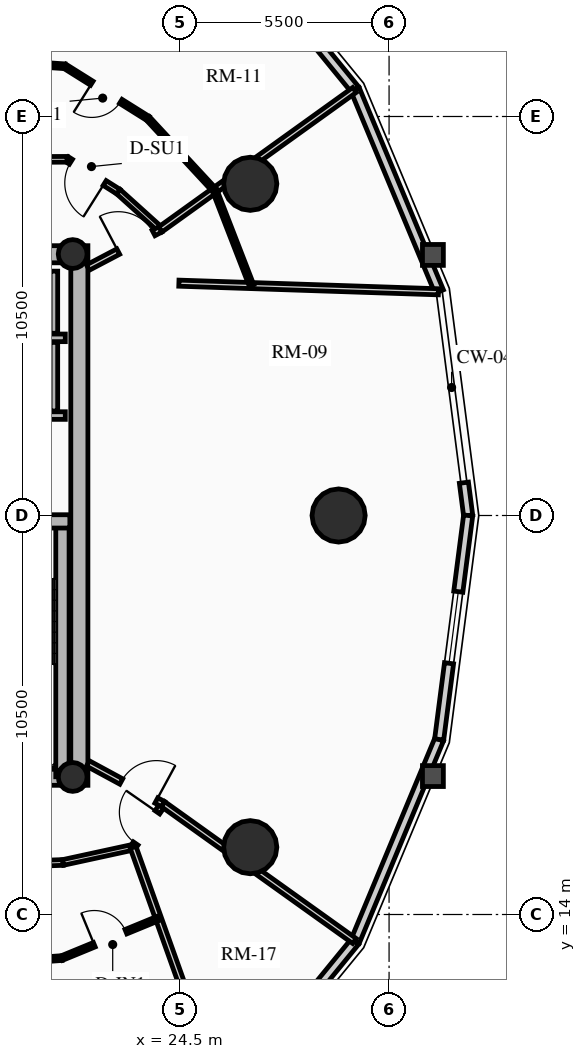
"""IFC4 building model, lengths in metres.
Left out: names, types, materials, properties, quantities, classifications, styles, units other than length and angle.
Written with IfcOpenShell. Run it as: python <this file> out.ifc"""

import sys

from ifc_helpers import new_model, si_unit, direction, frame, frame_2d, origin, origin_2d, place, context, subcontext, project, spatial, rectangle, circle, hollow_circle, extrude, source, transform, mapped, element, fill, save


model = new_model("IFC4")
c1 = context("Model", 3, precision=1e-05, world=origin(), true_north=direction((0.0, 1.0)))
c2 = subcontext(c1, "Body", "Model", "MODEL_VIEW")
j1 = project(units=[si_unit("LENGTHUNIT", "METRE"), si_unit("PLANEANGLEUNIT", "RADIAN")], contexts=[c1])
p1 = place(None, origin())
s1 = spatial("IfcSite", under=j1, at=p1, CompositionType="ELEMENT")
p2 = place(p1, origin())
s2 = spatial("IfcBuilding", under=s1, at=p2, CompositionType="ELEMENT")
p3 = place(p2, frame((0.0, 0.0, 107.98)))
s3 = spatial("IfcBuildingStorey", under=s2, at=p3, CompositionType="ELEMENT", Elevation=107.98)
p4 = place(p3, frame((21.85, 17.4, 0.0), z_axis=(0.0, 0.0, 1.0), x_axis=(0.0, 1.0, 0.0)))
e1 = element("IfcWall", 1, at=p4, inside=s3, PredefinedType="SHEAR", context=c2, shape_type="SweptSolid", body=[
    extrude(rectangle(XDim=14.2, YDim=0.45, at=frame_2d((7.1, 0.0))), origin(), (0.0, 0.0, 1.0), 2.91),
])
p5 = place(p3, frame((11.15, 17.625, 0.0), z_axis=(0.0, 0.0, 1.0), x_axis=(1.0, 0.0, 0.0)))
e2 = element("IfcWall", 2, at=p5, inside=s3, PredefinedType="SHEAR", context=c2, shape_type="SweptSolid", body=[
    extrude(rectangle(XDim=10.7, YDim=0.45, at=frame_2d((5.35, 0.0))), origin(), (0.0, 0.0, 1.0), 2.91),
])
m1 = source(origin(), c2, "Body", "SweptSolid", [
    extrude(rectangle(XDim=1.5, YDim=2.02, at=frame_2d((0.75, 1.01))), frame((0.0, 0.235, 0.0), z_axis=(0.0, -1.0, 0.0), x_axis=(1.0, 0.0, 0.0)), (0.0, 0.0, 1.0), 0.47),
])
p6 = place(p5, frame((5.45, 0.0, 0.0)))
e3 = element("IfcOpeningElement", 3, at=p6, cuts=e2, PredefinedType="OPENING", context=c2, shape_type="MappedRepresentation", body=[
    mapped(m1, transform((0.0, 0.0, 0.0), x_axis=(1.0, 0.0, 0.0), y_axis=(0.0, 1.0, 0.0), z_axis=(0.0, 0.0, 1.0), scale=1.0)),
])
p7 = place(p3, frame((11.15, 31.375, 0.0), z_axis=(0.0, 0.0, 1.0), x_axis=(1.0, 0.0, 0.0)))
e4 = element("IfcWall", 4, at=p7, inside=s3, PredefinedType="SHEAR", context=c2, shape_type="SweptSolid", body=[
    extrude(rectangle(XDim=10.7, YDim=0.45, at=frame_2d((5.35, 0.0))), origin(), (0.0, 0.0, 1.0), 2.91),
])
p8 = place(p7, frame((4.6, 0.0, 0.0)))
e5 = element("IfcOpeningElement", 5, at=p8, cuts=e4, PredefinedType="OPENING", context=c2, shape_type="MappedRepresentation", body=[
    mapped(m1, transform((0.0, 0.0, 0.0), x_axis=(1.0, 0.0, 0.0), y_axis=(0.0, 1.0, 0.0), z_axis=(0.0, 0.0, 1.0), scale=1.0)),
])
p9 = place(p3, frame((21.405, 17.625, 0.0), z_axis=(0.0, 0.0, 1.0), x_axis=(0.0, 1.0, 0.0)))
e6 = element("IfcWall", 6, at=p9, inside=s3, PredefinedType="SHEAR", context=c2, shape_type="SweptSolid", body=[
    extrude(rectangle(XDim=6.72, YDim=0.35, at=frame_2d((3.36, 0.0))), origin(), (0.0, 0.0, 1.0), 2.91),
])
p10 = place(p3, frame((18.315, 24.345, 0.0), z_axis=(0.0, 0.0, 1.0), x_axis=(1.0, 0.0, 0.0)))
e7 = element("IfcWall", 7, at=p10, inside=s3, PredefinedType="SHEAR", context=c2, shape_type="SweptSolid", body=[
    extrude(rectangle(XDim=3.285, YDim=0.35, at=frame_2d((1.643, 0.0))), origin(), (0.0, 0.0, 1.0), 2.91),
])
for number, where, z_axis, x_axis in (
    (8, (21.675, 17.62, 0.0), (0.0, 0.0, 1.0), (1.0, 0.0, 0.0)),
    (9, (21.675, 31.38, 0.0), (0.0, 0.0, 1.0), (1.0, 0.0, 0.0)),
):
    element("IfcColumn", number, at=place(p3, frame(where, z_axis=z_axis, x_axis=x_axis)), inside=s3, PredefinedType="COLUMN", context=c2, shape_type="SweptSolid", body=[
        extrude(hollow_circle(Radius=0.38, WallThickness=0.032, at=origin_2d()), origin(), (0.0, 0.0, 1.0), 2.91),
    ])
for number, where, z_axis, x_axis in (
    (10, (28.672, 24.5, 0.0), (0.0, 0.0, 1.0), (1.0, 0.0, 0.0)),
    (11, (26.347, 33.229, 0.0), (0.0, 0.0, 1.0), (1.0, 0.0, 0.0)),
    (12, (26.347, 15.771, 0.0), (0.0, 0.0, 1.0), (1.0, 0.0, 0.0)),
):
    element("IfcColumn", number, at=place(p3, frame(where, z_axis=z_axis, x_axis=x_axis)), inside=s3, PredefinedType="USERDEFINED", context=c2, shape_type="SweptSolid", body=[
        extrude(circle(Radius=0.7, at=origin_2d()), origin(), (0.0, 0.0, 1.0), 2.91),
    ])
p11 = place(p3, frame((31.969, 25.363, 0.0), z_axis=(0.0, 0.0, 1.0), x_axis=(0.128523364007, -0.991706481225, 0.0)))
e13 = element("IfcWall", 13, at=p11, inside=s3, PredefinedType="SOLIDWALL", context=c2, shape_type="SweptSolid", body=[
    extrude(rectangle(XDim=0.87, YDim=0.24, at=frame_2d((0.435, 0.0))), origin(), (0.0, 0.0, 1.0), 2.655),
])
p12 = place(p3, frame((29.105, 35.709, 0.0), z_axis=(0.0, 0.0, 1.0), x_axis=(0.384344417632, -0.923189779317, 0.0)))
e14 = element("IfcWall", 14, at=p12, inside=s3, PredefinedType="SOLIDWALL", context=c2, shape_type="SweptSolid", body=[
    extrude(rectangle(XDim=5.758, YDim=0.24, at=frame_2d((2.879, 0.0))), origin(), (0.0, 0.0, 1.0), 2.179),
])
p13 = place(p3, frame((25.658, 39.928, 0.0), z_axis=(0.0, 0.0, 1.0), x_axis=(0.632700781152, -0.77439635945, 0.0)))
e15 = element("IfcWall", 15, at=p13, inside=s3, PredefinedType="SOLIDWALL", context=c2, shape_type="SweptSolid", body=[
    extrude(rectangle(XDim=5.448, YDim=0.24, at=frame_2d((2.724, 0.0))), origin(), (0.0, 0.0, 1.0), 2.179),
])
m2 = source(origin(), c2, "Body", "SweptSolid", [
    extrude(rectangle(XDim=2.2, YDim=1.35, at=frame_2d((1.1, 0.675))), frame((0.0, 0.13, 0.0), z_axis=(0.0, -1.0, 0.0), x_axis=(1.0, 0.0, 0.0)), (0.0, 0.0, 1.0), 0.26),
])
p14 = place(p13, frame((1.624, 0.0, 0.65)))
e16 = element("IfcOpeningElement", 16, at=p14, cuts=e15, PredefinedType="OPENING", context=c2, shape_type="MappedRepresentation", body=[
    mapped(m2, transform((0.0, 0.0, 0.0), x_axis=(1.0, 0.0, 0.0), y_axis=(0.0, 1.0, 0.0), z_axis=(0.0, 0.0, 1.0), scale=1.0)),
])
p15 = place(p3, frame((29.105, 13.291, 0.0), z_axis=(0.0, 0.0, 1.0), x_axis=(-0.632700781152, -0.77439635945, 0.0)))
e17 = element("IfcWall", 17, at=p15, inside=s3, PredefinedType="SOLIDWALL", context=c2, shape_type="SweptSolid", body=[
    extrude(rectangle(XDim=5.448, YDim=0.24, at=frame_2d((2.724, 0.0))), origin(), (0.0, 0.0, 1.0), 2.179),
])
p16 = place(p15, frame((1.624, 0.0, 0.65)))
e18 = element("IfcOpeningElement", 18, at=p16, cuts=e17, PredefinedType="OPENING", context=c2, shape_type="MappedRepresentation", body=[
    mapped(m2, transform((0.0, 0.0, 0.0), x_axis=(1.0, 0.0, 0.0), y_axis=(0.0, 1.0, 0.0), z_axis=(0.0, 0.0, 1.0), scale=1.0)),
])
p17 = place(p3, frame((31.318, 18.607, 0.0), z_axis=(0.0, 0.0, 1.0), x_axis=(-0.384344417632, -0.923189779317, 0.0)))
e19 = element("IfcWall", 19, at=p17, inside=s3, PredefinedType="SOLIDWALL", context=c2, shape_type="SweptSolid", body=[
    extrude(rectangle(XDim=5.758, YDim=0.24, at=frame_2d((2.879, 0.0))), origin(), (0.0, 0.0, 1.0), 2.179),
])
p18 = place(p3, frame((32.081, 24.5, 0.0), z_axis=(0.0, 0.0, 1.0), x_axis=(-0.128351991996, -0.991728675672, 0.0)))
e20 = element("IfcWall", 20, at=p18, inside=s3, PredefinedType="SOLIDWALL", context=c2, shape_type="SweptSolid", body=[
    extrude(rectangle(XDim=5.942, YDim=0.24, at=frame_2d((2.971, 0.0))), origin(), (0.0, 0.0, 1.0), 2.179),
])
m3 = source(origin(), c2, "Body", "SweptSolid", [
    extrude(rectangle(XDim=1.9, YDim=1.35, at=frame_2d((0.95, 0.675))), frame((0.0, 0.13, 0.0), z_axis=(0.0, -1.0, 0.0), x_axis=(1.0, 0.0, 0.0)), (0.0, 0.0, 1.0), 0.26),
])
p19 = place(p18, frame((2.021, 0.0, 0.65)))
e21 = element("IfcOpeningElement", 21, at=p19, cuts=e20, PredefinedType="OPENING", context=c2, shape_type="MappedRepresentation", body=[
    mapped(m3, transform((0.0, 0.0, 0.0), x_axis=(1.0, 0.0, 0.0), y_axis=(0.0, 1.0, 0.0), z_axis=(0.0, 0.0, 1.0), scale=1.0)),
])
for number, where, z_axis, x_axis in (
    (22, (18.51, 27.13, 0.0), (0.0, 0.0, 1.0), (1.0, 0.0, 0.0)),
    (23, (18.51, 29.175, 0.0), (0.0, 0.0, 1.0), (1.0, 0.0, 0.0)),
):
    element("IfcWall", number, at=place(p3, frame(where, z_axis=z_axis, x_axis=x_axis)), inside=s3, PredefinedType="SHEAR", context=c2, shape_type="SweptSolid", body=[
        extrude(rectangle(XDim=2.97, YDim=0.2, at=frame_2d((1.485, 0.0))), origin(), (0.0, 0.0, 1.0), 2.91),
    ])
p20 = place(p3, frame((21.18, 27.25, 0.0), z_axis=(0.0, 0.0, 1.0), x_axis=(0.0, 1.0, 0.0)))
e24 = element("IfcWall", 24, at=p20, inside=s3, PredefinedType="SHEAR", context=c2, shape_type="SweptSolid", body=[
    extrude(rectangle(XDim=1.805, YDim=0.2, at=frame_2d((0.902, 0.0))), origin(), (0.0, 0.0, 1.0), 2.91),
])
p21 = place(p3, frame((21.18, 29.295, 0.0), z_axis=(0.0, 0.0, 1.0), x_axis=(0.0, 1.0, 0.0)))
e25 = element("IfcWall", 25, at=p21, inside=s3, PredefinedType="SHEAR", context=c2, shape_type="SweptSolid", body=[
    extrude(rectangle(XDim=1.635, YDim=0.2, at=frame_2d((0.817, 0.0))), origin(), (0.0, 0.0, 1.0), 2.91),
])
p22 = place(p3, frame((23.98, 32.027, 0.0), z_axis=(0.0, 0.0, 1.0), x_axis=(-0.742353224332, 0.670008724065, 0.0)))
e26 = element("IfcWall", 26, at=p22, inside=s3, PredefinedType="PARTITIONING", context=c2, shape_type="SweptSolid", body=[
    extrude(rectangle(XDim=1.485, YDim=0.15, at=frame_2d((0.742, 0.0))), origin(), (0.0, 0.0, 1.0), 2.225),
])
p23 = place(p3, frame((22.877, 33.022, 0.0), z_axis=(0.0, 0.0, 1.0), x_axis=(-0.845895608855, 0.533348496689, 0.0)))
e27 = element("IfcWall", 27, at=p23, inside=s3, PredefinedType="PARTITIONING", context=c2, shape_type="SweptSolid", body=[
    extrude(rectangle(XDim=1.597, YDim=0.15, at=frame_2d((0.798, 0.0))), origin(), (0.0, 0.0, 1.0), 2.225),
])
m4 = source(origin(), c2, "Body", "SweptSolid", [
    extrude(rectangle(XDim=1.05, YDim=2.015, at=frame_2d((0.525, 1.007))), frame((0.0, 0.085, 0.0), z_axis=(0.0, -1.0, 0.0), x_axis=(1.0, 0.0, 0.0)), (0.0, 0.0, 1.0), 0.17),
])
p24 = place(p23, frame((0.427, 0.0, 0.0)))
e28 = element("IfcOpeningElement", 28, at=p24, cuts=e27, PredefinedType="OPENING", context=c2, shape_type="MappedRepresentation", body=[
    mapped(m4, transform((0.0, 0.0, 0.0), x_axis=(1.0, 0.0, 0.0), y_axis=(0.0, 1.0, 0.0), z_axis=(0.0, 0.0, 1.0), scale=1.0)),
])
p25 = place(p3, frame((21.527, 33.873, 0.0), z_axis=(0.0, 0.0, 1.0), x_axis=(-0.999991838845, -0.004040079574, 0.0)))
e29 = element("IfcWall", 29, at=p25, inside=s3, PredefinedType="PARTITIONING", context=c2, shape_type="SweptSolid", body=[
    extrude(rectangle(XDim=3.384, YDim=0.15, at=frame_2d((1.692, 0.0))), origin(), (0.0, 0.0, 1.0), 2.225),
])
p26 = place(p3, frame((14.781, 15.141, 0.0), z_axis=(0.0, 0.0, 1.0), x_axis=(0.999407918707, 0.034406569513, 0.0)))
e30 = element("IfcWall", 30, at=p26, inside=s3, PredefinedType="PARTITIONING", context=c2, shape_type="SweptSolid", body=[
    extrude(rectangle(XDim=6.642, YDim=0.15, at=frame_2d((3.321, 0.0))), origin(), (0.0, 0.0, 1.0), 2.225),
])
p27 = place(p26, frame((2.796, 0.0, 0.0)))
e31 = element("IfcOpeningElement", 31, at=p27, cuts=e30, PredefinedType="OPENING", context=c2, shape_type="MappedRepresentation", body=[
    mapped(m4, transform((0.0, 0.0, 0.0), x_axis=(1.0, 0.0, 0.0), y_axis=(0.0, 1.0, 0.0), z_axis=(0.0, 0.0, 1.0), scale=1.0)),
])
p28 = place(p3, frame((21.419, 15.369, 0.0), z_axis=(0.0, 0.0, 1.0), x_axis=(0.977192701953, 0.212354475464, 0.0)))
e32 = element("IfcWall", 32, at=p28, inside=s3, PredefinedType="PARTITIONING", context=c2, shape_type="SweptSolid", body=[
    extrude(rectangle(XDim=1.888, YDim=0.15, at=frame_2d((0.944, 0.0))), origin(), (0.0, 0.0, 1.0), 2.225),
])
p29 = place(p3, frame((23.263, 15.77, 0.0), z_axis=(0.0, 0.0, 1.0), x_axis=(0.570743456919, 0.821128434768, 0.0)))
e33 = element("IfcWall", 33, at=p29, inside=s3, PredefinedType="PARTITIONING", context=c2, shape_type="SweptSolid", body=[
    extrude(rectangle(XDim=1.382, YDim=0.15, at=frame_2d((0.691, 0.0))), origin(), (0.0, 0.0, 1.0), 2.225),
])
m5 = source(origin(), c2, "Body", "SweptSolid", [
    extrude(rectangle(XDim=1.0, YDim=2.015, at=frame_2d((0.5, 1.007))), frame((0.0, 0.085, 0.0), z_axis=(0.0, -1.0, 0.0), x_axis=(1.0, 0.0, 0.0)), (0.0, 0.0, 1.0), 0.17),
])
p30 = place(p29, frame((0.12, 0.0, 0.0)))
e34 = element("IfcOpeningElement", 34, at=p30, cuts=e33, PredefinedType="OPENING", context=c2, shape_type="MappedRepresentation", body=[
    mapped(m5, transform((0.0, 0.0, 0.0), x_axis=(1.0, 0.0, 0.0), y_axis=(0.0, 1.0, 0.0), z_axis=(0.0, 0.0, 1.0), scale=1.0)),
])
p31 = place(p3, frame((24.469, 30.614, 0.0), z_axis=(0.0, 0.0, 1.0), x_axis=(0.999446768925, -0.033258924898, 0.0)))
e35 = element("IfcWall", 35, at=p31, inside=s3, PredefinedType="PARTITIONING", context=c2, shape_type="SweptSolid", body=[
    extrude(rectangle(XDim=6.834, YDim=0.16, at=frame_2d((3.417, 0.0))), origin(), (0.0, 0.0, 1.0), 2.179),
])
p32 = place(p3, frame((23.98, 32.027, 0.0), z_axis=(0.0, 0.0, 1.0), x_axis=(0.812162479031, 0.58343132214, 0.0)))
e36 = element("IfcWall", 36, at=p32, inside=s3, PredefinedType="PARTITIONING", context=c2, shape_type="SweptSolid", body=[
    extrude(rectangle(XDim=6.291, YDim=0.16, at=frame_2d((3.146, 0.0))), origin(), (0.0, 0.0, 1.0), 2.179),
])
p33 = place(p3, frame((23.263, 15.77, 0.0), z_axis=(0.0, 0.0, 1.0), x_axis=(0.335919964206, -0.941890533793, 0.0)))
e37 = element("IfcWall", 37, at=p33, inside=s3, PredefinedType="PARTITIONING", context=c2, shape_type="SweptSolid", body=[
    extrude(rectangle(XDim=7.094, YDim=0.16, at=frame_2d((3.547, 0.0))), origin(), (0.0, 0.0, 1.0), 2.179),
])
p34 = place(p3, frame((24.052, 16.905, 0.0), z_axis=(0.0, 0.0, 1.0), x_axis=(0.813437670746, -0.581652091727, 0.0)))
e38 = element("IfcWall", 38, at=p34, inside=s3, PredefinedType="PARTITIONING", context=c2, shape_type="SweptSolid", body=[
    extrude(rectangle(XDim=6.192, YDim=0.16, at=frame_2d((3.096, 0.0))), origin(), (0.0, 0.0, 1.0), 2.179),
])
p35 = place(p3, frame((22.075, 31.025, 0.0), z_axis=(0.0, 0.0, 1.0), x_axis=(0.885026466958, 0.465540710125, 0.0)))
e39 = element("IfcWall", 39, at=p35, inside=s3, PredefinedType="PARTITIONING", context=c2, shape_type="SweptSolid", body=[
    extrude(rectangle(XDim=2.152, YDim=0.16, at=frame_2d((1.076, 0.0))), origin(), (0.0, 0.0, 1.0), 2.225),
])
m6 = source(origin(), c2, "Body", "SweptSolid", [
    extrude(rectangle(XDim=1.05, YDim=2.015, at=frame_2d((0.525, 1.007))), frame((0.0, 0.09, 0.0), z_axis=(0.0, -1.0, 0.0), x_axis=(1.0, 0.0, 0.0)), (0.0, 0.0, 1.0), 0.18),
])
p36 = place(p35, frame((0.902, 0.0, 0.0)))
e40 = element("IfcOpeningElement", 40, at=p36, cuts=e39, PredefinedType="OPENING", context=c2, shape_type="MappedRepresentation", body=[
    mapped(m6, transform((0.0, 0.0, 0.0), x_axis=(1.0, 0.0, 0.0), y_axis=(0.0, 1.0, 0.0), z_axis=(0.0, 0.0, 1.0), scale=1.0)),
])
p37 = place(p3, frame((22.075, 17.975, 0.0), z_axis=(0.0, 0.0, 1.0), x_axis=(0.879356383302, -0.476164206073, 0.0)))
e41 = element("IfcWall", 41, at=p37, inside=s3, PredefinedType="PARTITIONING", context=c2, shape_type="SweptSolid", body=[
    extrude(rectangle(XDim=2.248, YDim=0.16, at=frame_2d((1.124, 0.0))), origin(), (0.0, 0.0, 1.0), 2.225),
])
p38 = place(p37, frame((0.998, 0.0, 0.0)))
e42 = element("IfcOpeningElement", 42, at=p38, cuts=e41, PredefinedType="OPENING", context=c2, shape_type="MappedRepresentation", body=[
    mapped(m6, transform((0.0, 0.0, 0.0), x_axis=(1.0, 0.0, 0.0), y_axis=(0.0, 1.0, 0.0), z_axis=(0.0, 0.0, 1.0), scale=1.0)),
])
p39 = place(p3, frame((26.382, 30.551, 0.0), z_axis=(0.0, 0.0, 1.0), x_axis=(-0.361621391028, 0.932325034283, 0.0)))
e43 = element("IfcWall", 43, at=p39, inside=s3, PredefinedType="PARTITIONING", context=c2, shape_type="SweptSolid", body=[
    extrude(rectangle(XDim=2.686, YDim=0.125, at=frame_2d((1.343, 0.0))), origin(), (0.0, 0.0, 1.0), 2.225),
])
p40 = place(p3, frame((25.41, 33.054, 0.0), z_axis=(0.0, 0.0, 1.0), x_axis=(-0.679733694606, 0.73345899982, 0.0)))
e44 = element("IfcWall", 44, at=p40, inside=s3, PredefinedType="PARTITIONING", context=c2, shape_type="SweptSolid", body=[
    extrude(rectangle(XDim=2.586, YDim=0.125, at=frame_2d((1.293, 0.0))), origin(), (0.0, 0.0, 1.0), 2.655),
])
p41 = place(p3, frame((23.653, 34.951, 0.0), z_axis=(0.0, 0.0, 1.0), x_axis=(-0.847306782665, 0.531103771452, 0.0)))
e45 = element("IfcWall", 45, at=p41, inside=s3, PredefinedType="PARTITIONING", context=c2, shape_type="SweptSolid", body=[
    extrude(rectangle(XDim=2.581, YDim=0.125, at=frame_2d((1.291, 0.0))), origin(), (0.0, 0.0, 1.0), 2.225),
])
m7 = source(origin(), c2, "Body", "SweptSolid", [
    extrude(rectangle(XDim=0.9, YDim=2.005, at=frame_2d((0.45, 1.002))), frame((0.0, 0.073, 0.0), z_axis=(0.0, -1.0, 0.0), x_axis=(1.0, 0.0, 0.0)), (0.0, 0.0, 1.0), 0.145),
])
p42 = place(p41, frame((0.841, 0.0, 0.0)))
e46 = element("IfcOpeningElement", 46, at=p42, cuts=e45, PredefinedType="OPENING", context=c2, shape_type="MappedRepresentation", body=[
    mapped(m7, transform((0.0, 0.0, 0.0), x_axis=(1.0, 0.0, 0.0), y_axis=(0.0, 1.0, 0.0), z_axis=(0.0, 0.0, 1.0), scale=1.0)),
])
p43 = place(p3, frame((21.466, 36.322, 0.0), z_axis=(0.0, 0.0, 1.0), x_axis=(-0.997806476515, 0.066198454847, 0.0)))
e47 = element("IfcWall", 47, at=p43, inside=s3, PredefinedType="PARTITIONING", context=c2, shape_type="SweptSolid", body=[
    extrude(rectangle(XDim=3.791, YDim=0.125, at=frame_2d((1.896, 0.0))), origin(), (0.0, 0.0, 1.0), 2.225),
])
p44 = place(p3, frame((15.262, 12.427, 0.0), z_axis=(0.0, 0.0, 1.0), x_axis=(0.997595855995, 0.069300130605, 0.0)))
e48 = element("IfcWall", 48, at=p44, inside=s3, PredefinedType="PARTITIONING", context=c2, shape_type="SweptSolid", body=[
    extrude(rectangle(XDim=6.14, YDim=0.125, at=frame_2d((3.07, 0.0))), origin(), (0.0, 0.0, 1.0), 2.225),
])
p45 = place(p3, frame((21.388, 12.853, 0.0), z_axis=(0.0, 0.0, 1.0), x_axis=(0.924757149715, 0.380557767036, 0.0)))
e49 = element("IfcWall", 49, at=p45, inside=s3, PredefinedType="PARTITIONING", context=c2, shape_type="SweptSolid", body=[
    extrude(rectangle(XDim=2.75, YDim=0.125, at=frame_2d((1.375, 0.0))), origin(), (0.0, 0.0, 1.0), 2.179),
])
p46 = place(p45, frame((0.925, 0.0, 0.0)))
e50 = element("IfcOpeningElement", 50, at=p46, cuts=e49, PredefinedType="OPENING", context=c2, shape_type="MappedRepresentation", body=[
    mapped(m7, transform((0.0, 0.0, 0.0), x_axis=(1.0, 0.0, 0.0), y_axis=(0.0, 1.0, 0.0), z_axis=(0.0, 0.0, 1.0), scale=1.0)),
])
m8 = source(origin(), c2, "Body", "SweptSolid", [
    extrude(rectangle(XDim=1.9, YDim=1.35, at=frame_2d((0.95, 0.675))), frame((0.0, 0.03, 0.0), z_axis=(0.0, -1.0, 0.0), x_axis=(1.0, 0.0, 0.0)), (0.0, 0.0, 1.0), 0.06),
])
p47 = place(p19, origin())
e51 = element("IfcWindow", 51, at=p47, inside=s3, PartitioningType="DOUBLE_PANEL_VERTICAL", PredefinedType="WINDOW", context=c2, shape_type="MappedRepresentation", body=[
    mapped(m8, transform((0.0, 0.0, 0.0), x_axis=(1.0, 0.0, 0.0), y_axis=(0.0, 1.0, 0.0), z_axis=(0.0, 0.0, 1.0), scale=1.0)),
])
fill(e21, e51)
m9 = source(origin(), c2, "Body", "SweptSolid", [
    extrude(rectangle(XDim=1.05, YDim=2.015, at=frame_2d((0.525, 1.007))), frame((0.0, 0.025, 0.0), z_axis=(0.0, -1.0, 0.0), x_axis=(1.0, 0.0, 0.0)), (0.0, 0.0, 1.0), 0.05),
])
p48 = place(p36, origin())
e52 = element("IfcDoor", 52, at=p48, inside=s3, OperationType="SINGLE_SWING_LEFT", PredefinedType="DOOR", context=c2, shape_type="MappedRepresentation", body=[
    mapped(m9, transform((0.0, 0.0, 0.0), x_axis=(1.0, 0.0, 0.0), y_axis=(0.0, 1.0, 0.0), z_axis=(0.0, 0.0, 1.0), scale=1.0)),
])
fill(e40, e52)
p49 = place(p38, origin())
e53 = element("IfcDoor", 53, at=p49, inside=s3, OperationType="SINGLE_SWING_RIGHT", PredefinedType="DOOR", context=c2, shape_type="MappedRepresentation", body=[
    mapped(m9, transform((0.0, 0.0, 0.0), x_axis=(1.0, 0.0, 0.0), y_axis=(0.0, 1.0, 0.0), z_axis=(0.0, 0.0, 1.0), scale=1.0)),
])
fill(e42, e53)
p50 = place(p24, origin())
e54 = element("IfcDoor", 54, at=p50, inside=s3, OperationType="SINGLE_SWING_LEFT", PredefinedType="DOOR", context=c2, shape_type="MappedRepresentation", body=[
    mapped(m9, transform((0.0, 0.0, 0.0), x_axis=(1.0, 0.0, 0.0), y_axis=(0.0, 1.0, 0.0), z_axis=(0.0, 0.0, 1.0), scale=1.0)),
])
fill(e28, e54)
m10 = source(origin(), c2, "Body", "SweptSolid", [
    extrude(rectangle(XDim=0.9, YDim=2.005, at=frame_2d((0.45, 1.002))), frame((0.0, 0.025, 0.0), z_axis=(0.0, -1.0, 0.0), x_axis=(1.0, 0.0, 0.0)), (0.0, 0.0, 1.0), 0.05),
])
p51 = place(p42, origin())
e55 = element("IfcDoor", 55, at=p51, inside=s3, OperationType="SINGLE_SWING_RIGHT", PredefinedType="DOOR", context=c2, shape_type="MappedRepresentation", body=[
    mapped(m10, transform((0.0, 0.0, 0.0), x_axis=(1.0, 0.0, 0.0), y_axis=(0.0, 1.0, 0.0), z_axis=(0.0, 0.0, 1.0), scale=1.0)),
])
fill(e46, e55)
p52 = place(p46, origin())
e56 = element("IfcDoor", 56, at=p52, inside=s3, OperationType="SINGLE_SWING_LEFT", PredefinedType="DOOR", context=c2, shape_type="MappedRepresentation", body=[
    mapped(m10, transform((0.0, 0.0, 0.0), x_axis=(1.0, 0.0, 0.0), y_axis=(0.0, 1.0, 0.0), z_axis=(0.0, 0.0, 1.0), scale=1.0)),
])
fill(e50, e56)
m11 = source(origin(), c2, "Body", "SweptSolid", [
    extrude(rectangle(XDim=1.0, YDim=2.015, at=frame_2d((0.5, 1.007))), frame((0.0, 0.025, 0.0), z_axis=(0.0, -1.0, 0.0), x_axis=(1.0, 0.0, 0.0)), (0.0, 0.0, 1.0), 0.05),
])
p53 = place(p30, origin())
e57 = element("IfcDoor", 57, at=p53, inside=s3, OperationType="SINGLE_SWING_RIGHT", PredefinedType="DOOR", context=c2, shape_type="MappedRepresentation", body=[
    mapped(m11, transform((0.0, 0.0, 0.0), x_axis=(1.0, 0.0, 0.0), y_axis=(0.0, 1.0, 0.0), z_axis=(0.0, 0.0, 1.0), scale=1.0)),
])
fill(e34, e57)
save(model, sys.argv[1])
